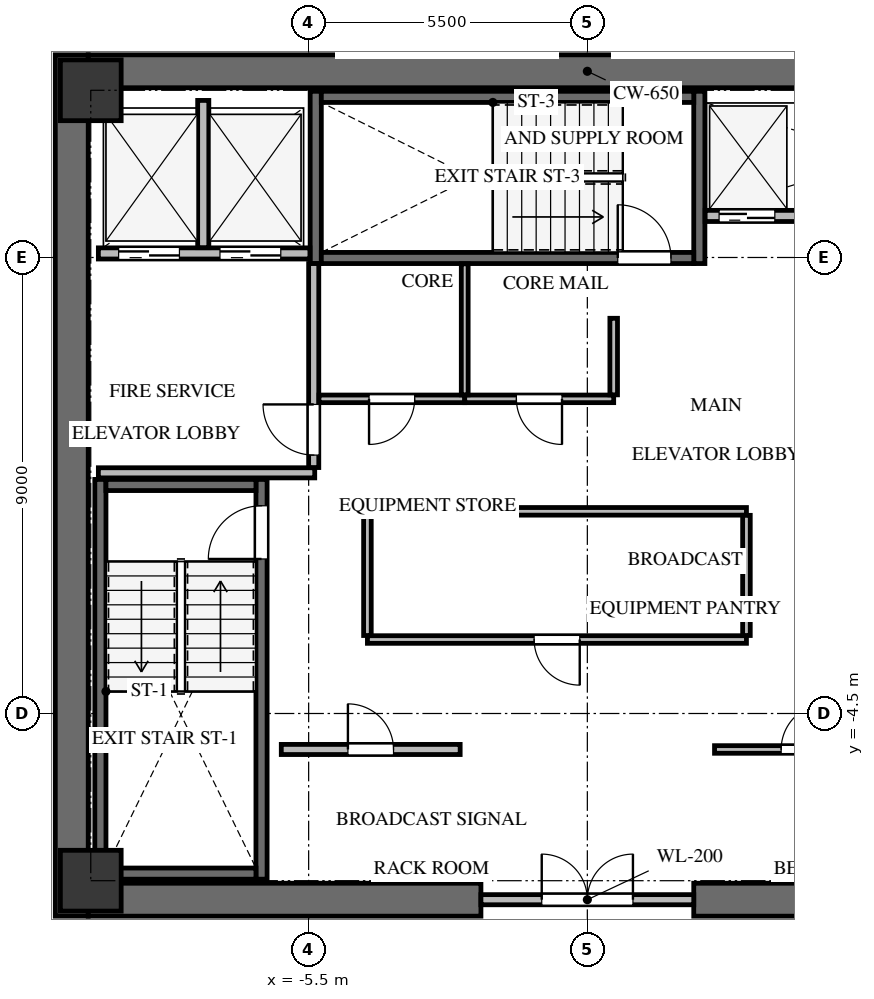
"""IFC4 building model, lengths in metres.
Left out: names, types, materials, properties, quantities, classifications, styles, units other than length and angle.
Written with IfcOpenShell. Run it as: python <this file> out.ifc"""

import sys

from ifc_helpers import new_model, si_unit, direction, frame, frame_2d, origin, origin_2d, place, context, subcontext, project, spatial, rectangle, extrude, source, transform, mapped, element, fill, save


model = new_model("IFC4")
c1 = context("Model", 3, precision=1e-05, world=origin(), true_north=direction((0.0, 1.0)))
c2 = subcontext(c1, "Body", "Model", "MODEL_VIEW")
j1 = project(units=[si_unit("LENGTHUNIT", "METRE"), si_unit("PLANEANGLEUNIT", "RADIAN")], contexts=[c1])
p1 = place(None, origin())
s1 = spatial("IfcSite", under=j1, at=p1, CompositionType="ELEMENT")
p2 = place(p1, origin())
s2 = spatial("IfcBuilding", under=s1, at=p2, CompositionType="ELEMENT")
p3 = place(p2, frame((0.0, 0.0, 159.3)))
s3 = spatial("IfcBuildingStorey", under=s2, at=p3, CompositionType="ELEMENT", Elevation=159.3)
p4 = place(p3, frame((-10.175, -8.5, 0.0), z_axis=(0.0, 0.0, 1.0), x_axis=(0.0, 1.0, 0.0)))
e1 = element("IfcWall", 1, at=p4, inside=s3, PredefinedType="SHEAR", context=c2, shape_type="SweptSolid", body=[
    extrude(rectangle(XDim=17.0, YDim=0.65, at=frame_2d((8.5, 0.0))), origin(), (0.0, 0.0, 1.0), 3.3),
])
for number, where, z_axis, x_axis in (
    (2, (-9.85, -8.175, 0.0), (0.0, 0.0, 1.0), (1.0, 0.0, 0.0)),
    (3, (2.1, -8.175, 0.0), (0.0, 0.0, 1.0), (1.0, 0.0, 0.0)),
):
    element("IfcWall", number, at=place(p3, frame(where, z_axis=z_axis, x_axis=x_axis)), inside=s3, PredefinedType="SHEAR", context=c2, shape_type="SweptSolid", body=[
        extrude(rectangle(XDim=7.75, YDim=0.65, at=frame_2d((3.875, 0.0))), origin(), (0.0, 0.0, 1.0), 3.3),
    ])
p5 = place(p3, frame((-9.85, 8.175, 0.0), z_axis=(0.0, 0.0, 1.0), x_axis=(1.0, 0.0, 0.0)))
e4 = element("IfcWall", 4, at=p5, inside=s3, PredefinedType="SHEAR", context=c2, shape_type="SweptSolid", body=[
    extrude(rectangle(XDim=19.7, YDim=0.65, at=frame_2d((9.85, 0.0))), origin(), (0.0, 0.0, 1.0), 3.3),
])
p6 = place(p3, frame((-6.43, -7.77, -0.24), z_axis=(0.0, 0.0, 1.0), x_axis=(0.0, 1.0, 0.0)))
e5 = element("IfcWall", 5, at=p6, inside=s3, PredefinedType="SHEAR", context=c2, shape_type="SweptSolid", body=[
    extrude(rectangle(XDim=7.89, YDim=0.22, at=frame_2d((3.945, 0.0))), origin(), (0.0, 0.0, 1.0), 3.22),
])
p7 = place(p6, frame((6.32, 0.0, 0.0)))
e6 = element("IfcOpeningElement", 6, at=p7, cuts=e5, PredefinedType="OPENING", context=c2, shape_type="SweptSolid", body=[
    extrude(rectangle(XDim=1.05, YDim=2.15, at=frame_2d((0.525, 1.075))), frame((0.0, 0.12, 0.0), z_axis=(0.0, -1.0, 0.0), x_axis=(1.0, 0.0, 0.0)), (0.0, 0.0, 1.0), 0.24),
])
p8 = place(p3, frame((-9.61, 0.12, -0.24), z_axis=(0.0, 0.0, 1.0), x_axis=(0.0, -1.0, 0.0)))
e7 = element("IfcWall", 7, at=p8, inside=s3, PredefinedType="SHEAR", context=c2, shape_type="SweptSolid", body=[
    extrude(rectangle(XDim=7.89, YDim=0.22, at=frame_2d((3.945, 0.0))), origin(), (0.0, 0.0, 1.0), 3.22),
])
for number, where, z_axis, x_axis in (
    (8, (-9.5, -7.66, -0.24), (0.0, 0.0, 1.0), (1.0, 0.0, 0.0)),
    (9, (-6.54, 0.01, -0.24), (0.0, 0.0, 1.0), (-1.0, 0.0, 0.0)),
):
    element("IfcWall", number, at=place(p3, frame(where, z_axis=z_axis, x_axis=x_axis)), inside=s3, PredefinedType="SHEAR", context=c2, shape_type="SweptSolid", body=[
        extrude(rectangle(XDim=2.96, YDim=0.22, at=frame_2d((1.48, 0.0))), origin(), (0.0, 0.0, 1.0), 3.22),
    ])
for number, where, z_axis, x_axis in (
    (10, (2.21, 4.38, -0.24), (0.0, 0.0, 1.0), (0.0, 1.0, 0.0)),
    (11, (-5.36, 7.78, -0.24), (0.0, 0.0, 1.0), (0.0, -1.0, 0.0)),
):
    element("IfcWall", number, at=place(p3, frame(where, z_axis=z_axis, x_axis=x_axis)), inside=s3, PredefinedType="SHEAR", context=c2, shape_type="SweptSolid", body=[
        extrude(rectangle(XDim=3.4, YDim=0.22, at=frame_2d((1.7, 0.0))), origin(), (0.0, 0.0, 1.0), 3.22),
    ])
p9 = place(p3, frame((-5.25, 4.49, -0.24), z_axis=(0.0, 0.0, 1.0), x_axis=(1.0, 0.0, 0.0)))
e12 = element("IfcWall", 12, at=p9, inside=s3, PredefinedType="SHEAR", context=c2, shape_type="SweptSolid", body=[
    extrude(rectangle(XDim=7.35, YDim=0.22, at=frame_2d((3.675, 0.0))), origin(), (0.0, 0.0, 1.0), 3.22),
])
p10 = place(p9, frame((5.85, 0.0, 0.0)))
e13 = element("IfcOpeningElement", 13, at=p10, cuts=e12, PredefinedType="OPENING", context=c2, shape_type="SweptSolid", body=[
    extrude(rectangle(XDim=1.05, YDim=2.15, at=frame_2d((0.525, 1.075))), frame((0.0, 0.12, 0.0), z_axis=(0.0, -1.0, 0.0), x_axis=(1.0, 0.0, 0.0)), (0.0, 0.0, 1.0), 0.24),
])
p11 = place(p3, frame((2.1, 7.67, -0.24), z_axis=(0.0, 0.0, 1.0), x_axis=(-1.0, 0.0, 0.0)))
e14 = element("IfcWall", 14, at=p11, inside=s3, PredefinedType="SHEAR", context=c2, shape_type="SweptSolid", body=[
    extrude(rectangle(XDim=7.35, YDim=0.22, at=frame_2d((3.675, 0.0))), origin(), (0.0, 0.0, 1.0), 3.22),
])
m1 = source(origin(), c2, "Body", "SweptSolid", [
    extrude(rectangle(XDim=1.2, YDim=1.2, at=origin_2d()), origin(), (0.0, 0.0, 1.0), 3.22),
])
for number, where, z_axis, x_axis in (
    (15, (-9.8, -7.8, -0.24), (0.0, 0.0, 1.0), (1.0, 0.0, 0.0)),
    (16, (-9.8, 7.8, -0.24), (0.0, 0.0, 1.0), (1.0, 0.0, 0.0)),
):
    element("IfcColumn", number, at=place(p3, frame(where, z_axis=z_axis, x_axis=x_axis)), inside=s3, PredefinedType="COLUMN", context=c2, shape_type="MappedRepresentation", body=[
        mapped(m1, transform((0.0, 0.0, 0.0), x_axis=(1.0, 0.0, 0.0), y_axis=(0.0, 1.0, 0.0), z_axis=(0.0, 0.0, 1.0), scale=1.0)),
    ])
p12 = place(p3, frame((-2.1, -8.175, 0.0), z_axis=(0.0, 0.0, 1.0), x_axis=(1.0, 0.0, 0.0)))
e17 = element("IfcWall", 17, at=p12, inside=s3, PredefinedType="SOLIDWALL", context=c2, shape_type="SweptSolid", body=[
    extrude(rectangle(XDim=4.2, YDim=0.2, at=frame_2d((2.1, 0.0))), origin(), (0.0, 0.0, 1.0), 2.965),
])
p13 = place(p12, frame((1.2, 0.0, 0.0)))
e18 = element("IfcOpeningElement", 18, at=p13, cuts=e17, PredefinedType="OPENING", context=c2, shape_type="SweptSolid", body=[
    extrude(rectangle(XDim=1.8, YDim=2.15, at=frame_2d((0.9, 1.075))), frame((0.0, 0.11, 0.0), z_axis=(0.0, -1.0, 0.0), x_axis=(1.0, 0.0, 0.0)), (0.0, 0.0, 1.0), 0.22),
])
p14 = place(p3, frame((-9.65, 4.58, 0.0), z_axis=(0.0, 0.0, 1.0), x_axis=(1.0, 0.0, 0.0)))
e19 = element("IfcWall", 19, at=p14, inside=s3, PredefinedType="SOLIDWALL", context=c2, shape_type="SweptSolid", body=[
    extrude(rectangle(XDim=4.175, YDim=0.22, at=frame_2d((2.087, 0.0))), origin(), (0.0, 0.0, 1.0), 2.965),
])
p15 = place(p14, frame((0.4, 0.0, 0.0)))
e20 = element("IfcOpeningElement", 20, at=p15, cuts=e19, PredefinedType="OPENING", context=c2, shape_type="SweptSolid", body=[
    extrude(rectangle(XDim=1.2, YDim=2.15, at=frame_2d((0.6, 1.075))), frame((0.0, 0.12, 0.0), z_axis=(0.0, -1.0, 0.0), x_axis=(1.0, 0.0, 0.0)), (0.0, 0.0, 1.0), 0.24),
])
p16 = place(p14, frame((2.4, 0.0, 0.0)))
e21 = element("IfcOpeningElement", 21, at=p16, cuts=e19, PredefinedType="OPENING", context=c2, shape_type="SweptSolid", body=[
    extrude(rectangle(XDim=1.2, YDim=2.15, at=frame_2d((0.6, 1.075))), frame((0.0, 0.12, 0.0), z_axis=(0.0, -1.0, 0.0), x_axis=(1.0, 0.0, 0.0)), (0.0, 0.0, 1.0), 0.24),
])
p17 = place(p3, frame((-7.58, 4.694, 0.0), z_axis=(0.0, 0.0, 1.0), x_axis=(0.0, 1.0, 0.0)))
e22 = element("IfcWall", 22, at=p17, inside=s3, PredefinedType="SOLIDWALL", context=c2, shape_type="SweptSolid", body=[
    extrude(rectangle(XDim=2.906, YDim=0.22, at=frame_2d((1.453, 0.0))), origin(), (0.0, 0.0, 1.0), 2.965),
])
p18 = place(p3, frame((-9.65, 0.25, 0.0), z_axis=(0.0, 0.0, 1.0), x_axis=(1.0, 0.0, 0.0)))
e23 = element("IfcWall", 23, at=p18, inside=s3, PredefinedType="SOLIDWALL", context=c2, shape_type="SweptSolid", body=[
    extrude(rectangle(XDim=4.27, YDim=0.2, at=frame_2d((2.135, 0.0))), origin(), (0.0, 0.0, 1.0), 2.965),
])
p19 = place(p3, frame((-5.4, 0.354, 0.0), z_axis=(0.0, 0.0, 1.0), x_axis=(0.0, 1.0, 0.0)))
e24 = element("IfcWall", 24, at=p19, inside=s3, PredefinedType="SOLIDWALL", context=c2, shape_type="SweptSolid", body=[
    extrude(rectangle(XDim=4.026, YDim=0.2, at=frame_2d((2.013, 0.0))), origin(), (0.0, 0.0, 1.0), 2.965),
])
p20 = place(p19, frame((0.246, 0.0, 0.0)))
e25 = element("IfcOpeningElement", 25, at=p20, cuts=e24, PredefinedType="OPENING", context=c2, shape_type="SweptSolid", body=[
    extrude(rectangle(XDim=1.0, YDim=2.15, at=frame_2d((0.5, 1.075))), frame((0.0, 0.11, 0.0), z_axis=(0.0, -1.0, 0.0), x_axis=(1.0, 0.0, 0.0)), (0.0, 0.0, 1.0), 0.22),
])
p21 = place(p3, frame((2.325, 5.32, 0.0), z_axis=(0.0, 0.0, 1.0), x_axis=(1.0, 0.0, 0.0)))
e26 = element("IfcWall", 26, at=p21, inside=s3, PredefinedType="SOLIDWALL", context=c2, shape_type="SweptSolid", body=[
    extrude(rectangle(XDim=7.325, YDim=0.22, at=frame_2d((3.663, 0.0))), origin(), (0.0, 0.0, 1.0), 2.965),
])
p22 = place(p21, frame((0.275, 0.0, 0.0)))
e27 = element("IfcOpeningElement", 27, at=p22, cuts=e26, PredefinedType="OPENING", context=c2, shape_type="SweptSolid", body=[
    extrude(rectangle(XDim=1.1, YDim=2.15, at=frame_2d((0.55, 1.075))), frame((0.0, 0.12, 0.0), z_axis=(0.0, -1.0, 0.0), x_axis=(1.0, 0.0, 0.0)), (0.0, 0.0, 1.0), 0.24),
])
p23 = place(p21, frame((2.045, 0.0, 0.0)))
e28 = element("IfcOpeningElement", 28, at=p23, cuts=e26, PredefinedType="OPENING", context=c2, shape_type="SweptSolid", body=[
    extrude(rectangle(XDim=1.1, YDim=2.15, at=frame_2d((0.55, 1.075))), frame((0.0, 0.12, 0.0), z_axis=(0.0, -1.0, 0.0), x_axis=(1.0, 0.0, 0.0)), (0.0, 0.0, 1.0), 0.24),
])
p24 = place(p21, frame((3.815, 0.0, 0.0)))
e29 = element("IfcOpeningElement", 29, at=p24, cuts=e26, PredefinedType="OPENING", context=c2, shape_type="SweptSolid", body=[
    extrude(rectangle(XDim=1.1, YDim=2.15, at=frame_2d((0.55, 1.075))), frame((0.0, 0.12, 0.0), z_axis=(0.0, -1.0, 0.0), x_axis=(1.0, 0.0, 0.0)), (0.0, 0.0, 1.0), 0.24),
])
p25 = place(p21, frame((5.585, 0.0, 0.0)))
e30 = element("IfcOpeningElement", 30, at=p25, cuts=e26, PredefinedType="OPENING", context=c2, shape_type="SweptSolid", body=[
    extrude(rectangle(XDim=1.1, YDim=2.15, at=frame_2d((0.55, 1.075))), frame((0.0, 0.12, 0.0), z_axis=(0.0, -1.0, 0.0), x_axis=(1.0, 0.0, 0.0)), (0.0, 0.0, 1.0), 0.24),
])
p26 = place(p3, frame((-6.04, -5.21, 0.0), z_axis=(0.0, 0.0, 1.0), x_axis=(1.0, 0.0, 0.0)))
e31 = element("IfcWall", 31, at=p26, inside=s3, PredefinedType="SOLIDWALL", context=c2, shape_type="SweptSolid", body=[
    extrude(rectangle(XDim=3.53, YDim=0.2, at=frame_2d((1.765, 0.0))), origin(), (0.0, 0.0, 1.0), 2.965),
])
p27 = place(p26, frame((1.315, 0.0, 0.0)))
e32 = element("IfcOpeningElement", 32, at=p27, cuts=e31, PredefinedType="OPENING", context=c2, shape_type="SweptSolid", body=[
    extrude(rectangle(XDim=0.9, YDim=2.05, at=frame_2d((0.45, 1.025))), frame((0.0, 0.11, 0.0), z_axis=(0.0, -1.0, 0.0), x_axis=(1.0, 0.0, 0.0)), (0.0, 0.0, 1.0), 0.22),
])
p28 = place(p3, frame((2.51, -5.21, 0.0), z_axis=(0.0, 0.0, 1.0), x_axis=(1.0, 0.0, 0.0)))
e33 = element("IfcWall", 33, at=p28, inside=s3, PredefinedType="PARTITIONING", context=c2, shape_type="SweptSolid", body=[
    extrude(rectangle(XDim=3.53, YDim=0.15, at=frame_2d((1.765, 0.0))), origin(), (0.0, 0.0, 1.0), 2.965),
])
p29 = place(p28, frame((1.315, 0.0, 0.0)))
e34 = element("IfcOpeningElement", 34, at=p29, cuts=e33, PredefinedType="OPENING", context=c2, shape_type="SweptSolid", body=[
    extrude(rectangle(XDim=0.9, YDim=2.05, at=frame_2d((0.45, 1.025))), frame((0.0, 0.085, 0.0), z_axis=(0.0, -1.0, 0.0), x_axis=(1.0, 0.0, 0.0)), (0.0, 0.0, 1.0), 0.17),
])
p30 = place(p3, frame((3.14, -3.04, 0.0), z_axis=(0.0, 0.0, 1.0), x_axis=(-1.0, 0.0, 0.0)))
e35 = element("IfcWall", 35, at=p30, inside=s3, PredefinedType="PARTITIONING", context=c2, shape_type="SweptSolid", body=[
    extrude(rectangle(XDim=7.48, YDim=0.15, at=frame_2d((3.74, 0.0))), origin(), (0.0, 0.0, 1.0), 2.965),
])
p31 = place(p30, frame((3.29, 0.0, 0.0)))
e36 = element("IfcOpeningElement", 36, at=p31, cuts=e35, PredefinedType="OPENING", context=c2, shape_type="SweptSolid", body=[
    extrude(rectangle(XDim=0.9, YDim=2.05, at=frame_2d((0.45, 1.025))), frame((0.0, 0.085, 0.0), z_axis=(0.0, -1.0, 0.0), x_axis=(1.0, 0.0, 0.0)), (0.0, 0.0, 1.0), 0.17),
])
p32 = place(p3, frame((-4.34, -0.51, 0.0), z_axis=(0.0, 0.0, 1.0), x_axis=(1.0, 0.0, 0.0)))
e37 = element("IfcWall", 37, at=p32, inside=s3, PredefinedType="PARTITIONING", context=c2, shape_type="SweptSolid", body=[
    extrude(rectangle(XDim=7.48, YDim=0.15, at=frame_2d((3.74, 0.0))), origin(), (0.0, 0.0, 1.0), 2.965),
])
for number, where, z_axis, x_axis in (
    (38, (-4.34, -2.961, 0.0), (0.0, 0.0, 1.0), (0.0, 1.0, 0.0)),
    (39, (3.14, -0.589, 0.0), (0.0, 0.0, 1.0), (0.0, -1.0, 0.0)),
):
    element("IfcWall", number, at=place(p3, frame(where, z_axis=z_axis, x_axis=x_axis)), inside=s3, PredefinedType="PARTITIONING", context=c2, shape_type="SweptSolid", body=[
        extrude(rectangle(XDim=2.372, YDim=0.15, at=frame_2d((1.186, 0.0))), origin(), (0.0, 0.0, 1.0), 2.965),
    ])
p33 = place(p3, frame((-2.42, 1.71, 0.0), z_axis=(0.0, 0.0, 1.0), x_axis=(-1.0, 0.0, 0.0)))
e40 = element("IfcWall", 40, at=p33, inside=s3, PredefinedType="PARTITIONING", context=c2, shape_type="SweptSolid", body=[
    extrude(rectangle(XDim=2.876, YDim=0.15, at=frame_2d((1.438, 0.0))), origin(), (0.0, 0.0, 1.0), 2.965),
])
p34 = place(p33, frame((0.988, 0.0, 0.0)))
e41 = element("IfcOpeningElement", 41, at=p34, cuts=e40, PredefinedType="OPENING", context=c2, shape_type="SweptSolid", body=[
    extrude(rectangle(XDim=0.9, YDim=2.05, at=frame_2d((0.45, 1.025))), frame((0.0, 0.085, 0.0), z_axis=(0.0, -1.0, 0.0), x_axis=(1.0, 0.0, 0.0)), (0.0, 0.0, 1.0), 0.17),
])
p35 = place(p3, frame((0.52, 1.71, 0.0), z_axis=(0.0, 0.0, 1.0), x_axis=(-1.0, 0.0, 0.0)))
e42 = element("IfcWall", 42, at=p35, inside=s3, PredefinedType="PARTITIONING", context=c2, shape_type="SweptSolid", body=[
    extrude(rectangle(XDim=2.94, YDim=0.15, at=frame_2d((1.47, 0.0))), origin(), (0.0, 0.0, 1.0), 2.965),
])
p36 = place(p35, frame((1.02, 0.0, 0.0)))
e43 = element("IfcOpeningElement", 43, at=p36, cuts=e42, PredefinedType="OPENING", context=c2, shape_type="SweptSolid", body=[
    extrude(rectangle(XDim=0.9, YDim=2.05, at=frame_2d((0.45, 1.025))), frame((0.0, 0.085, 0.0), z_axis=(0.0, -1.0, 0.0), x_axis=(1.0, 0.0, 0.0)), (0.0, 0.0, 1.0), 0.17),
])
p37 = place(p3, frame((0.52, 3.3, 0.0), z_axis=(0.0, 0.0, 1.0), x_axis=(0.0, -1.0, 0.0)))
e44 = element("IfcWall", 44, at=p37, inside=s3, PredefinedType="PARTITIONING", context=c2, shape_type="SweptSolid", body=[
    extrude(rectangle(XDim=1.511, YDim=0.15, at=frame_2d((0.755, 0.0))), origin(), (0.0, 0.0, 1.0), 2.965),
])
p38 = place(p3, frame((-2.42, 4.375, 0.0), z_axis=(0.0, 0.0, 1.0), x_axis=(0.0, -1.0, 0.0)))
e45 = element("IfcWall", 45, at=p38, inside=s3, PredefinedType="PARTITIONING", context=c2, shape_type="SweptSolid", body=[
    extrude(rectangle(XDim=2.586, YDim=0.135, at=frame_2d((1.293, 0.0))), origin(), (0.0, 0.0, 1.0), 2.965),
])
m2 = source(origin(), c2, "Body", "SweptSolid", [
    extrude(rectangle(XDim=1.05, YDim=2.15, at=frame_2d((0.525, 1.075))), frame((0.0, 0.025, 0.0), z_axis=(0.0, -1.0, 0.0), x_axis=(1.0, 0.0, 0.0)), (0.0, 0.0, 1.0), 0.05),
])
p39 = place(p7, origin())
e46 = element("IfcDoor", 46, at=p39, inside=s3, OperationType="SINGLE_SWING_LEFT", PredefinedType="DOOR", context=c2, shape_type="MappedRepresentation", body=[
    mapped(m2, transform((0.0, 0.0, 0.0), x_axis=(1.0, 0.0, 0.0), y_axis=(0.0, 1.0, 0.0), z_axis=(0.0, 0.0, 1.0), scale=1.0)),
])
fill(e6, e46)
p40 = place(p10, origin())
e47 = element("IfcDoor", 47, at=p40, inside=s3, OperationType="SINGLE_SWING_LEFT", PredefinedType="DOOR", context=c2, shape_type="MappedRepresentation", body=[
    mapped(m2, transform((0.0, 0.0, 0.0), x_axis=(1.0, 0.0, 0.0), y_axis=(0.0, 1.0, 0.0), z_axis=(0.0, 0.0, 1.0), scale=1.0)),
])
fill(e13, e47)
m3 = source(origin(), c2, "Body", "SweptSolid", [
    extrude(rectangle(XDim=1.8, YDim=2.15, at=frame_2d((0.9, 1.075))), frame((0.0, 0.025, 0.0), z_axis=(0.0, -1.0, 0.0), x_axis=(1.0, 0.0, 0.0)), (0.0, 0.0, 1.0), 0.05),
])
p41 = place(p13, origin())
e48 = element("IfcDoor", 48, at=p41, inside=s3, OperationType="DOUBLE_DOOR_SINGLE_SWING", PredefinedType="DOOR", context=c2, shape_type="MappedRepresentation", body=[
    mapped(m3, transform((0.0, 0.0, 0.0), x_axis=(1.0, 0.0, 0.0), y_axis=(0.0, 1.0, 0.0), z_axis=(0.0, 0.0, 1.0), scale=1.0)),
])
fill(e18, e48)
m4 = source(origin(), c2, "Body", "SweptSolid", [
    extrude(rectangle(XDim=1.2, YDim=2.15, at=frame_2d((0.6, 1.075))), frame((0.0, 0.025, 0.0), z_axis=(0.0, -1.0, 0.0), x_axis=(1.0, 0.0, 0.0)), (0.0, 0.0, 1.0), 0.05),
])
p42 = place(p15, origin())
e49 = element("IfcDoor", 49, at=p42, inside=s3, OperationType="DOUBLE_DOOR_SLIDING", PredefinedType="DOOR", context=c2, shape_type="MappedRepresentation", body=[
    mapped(m4, transform((0.0, 0.0, 0.0), x_axis=(1.0, 0.0, 0.0), y_axis=(0.0, 1.0, 0.0), z_axis=(0.0, 0.0, 1.0), scale=1.0)),
])
fill(e20, e49)
p43 = place(p16, origin())
e50 = element("IfcDoor", 50, at=p43, inside=s3, OperationType="DOUBLE_DOOR_SLIDING", PredefinedType="DOOR", context=c2, shape_type="MappedRepresentation", body=[
    mapped(m4, transform((0.0, 0.0, 0.0), x_axis=(1.0, 0.0, 0.0), y_axis=(0.0, 1.0, 0.0), z_axis=(0.0, 0.0, 1.0), scale=1.0)),
])
fill(e21, e50)
m5 = source(origin(), c2, "Body", "SweptSolid", [
    extrude(rectangle(XDim=1.0, YDim=2.15, at=frame_2d((0.5, 1.075))), frame((0.0, 0.025, 0.0), z_axis=(0.0, -1.0, 0.0), x_axis=(1.0, 0.0, 0.0)), (0.0, 0.0, 1.0), 0.05),
])
p44 = place(p20, origin())
e51 = element("IfcDoor", 51, at=p44, inside=s3, OperationType="SINGLE_SWING_RIGHT", PredefinedType="DOOR", context=c2, shape_type="MappedRepresentation", body=[
    mapped(m5, transform((0.0, 0.0, 0.0), x_axis=(1.0, 0.0, 0.0), y_axis=(0.0, 1.0, 0.0), z_axis=(0.0, 0.0, 1.0), scale=1.0)),
])
fill(e25, e51)
m6 = source(origin(), c2, "Body", "SweptSolid", [
    extrude(rectangle(XDim=1.1, YDim=2.15, at=frame_2d((0.55, 1.075))), frame((0.0, 0.025, 0.0), z_axis=(0.0, -1.0, 0.0), x_axis=(1.0, 0.0, 0.0)), (0.0, 0.0, 1.0), 0.05),
])
p45 = place(p22, origin())
e52 = element("IfcDoor", 52, at=p45, inside=s3, OperationType="DOUBLE_DOOR_SLIDING", PredefinedType="DOOR", context=c2, shape_type="MappedRepresentation", body=[
    mapped(m6, transform((0.0, 0.0, 0.0), x_axis=(1.0, 0.0, 0.0), y_axis=(0.0, 1.0, 0.0), z_axis=(0.0, 0.0, 1.0), scale=1.0)),
])
fill(e27, e52)
m7 = source(origin(), c2, "Body", "SweptSolid", [
    extrude(rectangle(XDim=0.9, YDim=2.05, at=frame_2d((0.45, 1.025))), frame((0.0, 0.025, 0.0), z_axis=(0.0, -1.0, 0.0), x_axis=(1.0, 0.0, 0.0)), (0.0, 0.0, 1.0), 0.05),
])
p46 = place(p27, origin())
e53 = element("IfcDoor", 53, at=p46, inside=s3, OperationType="SINGLE_SWING_LEFT", PredefinedType="DOOR", context=c2, shape_type="MappedRepresentation", body=[
    mapped(m7, transform((0.0, 0.0, 0.0), x_axis=(1.0, 0.0, 0.0), y_axis=(0.0, 1.0, 0.0), z_axis=(0.0, 0.0, 1.0), scale=1.0)),
])
fill(e32, e53)
m8 = source(origin(), c2, "Body", "SweptSolid", [
    extrude(rectangle(XDim=0.9, YDim=2.05, at=frame_2d((0.45, 1.025))), frame((0.0, 0.025, 0.0), z_axis=(0.0, -1.0, 0.0), x_axis=(1.0, 0.0, 0.0)), (0.0, 0.0, 1.0), 0.05),
])
p47 = place(p29, origin())
e54 = element("IfcDoor", 54, at=p47, inside=s3, OperationType="SINGLE_SWING_RIGHT", PredefinedType="DOOR", context=c2, shape_type="MappedRepresentation", body=[
    mapped(m8, transform((0.0, 0.0, 0.0), x_axis=(1.0, 0.0, 0.0), y_axis=(0.0, 1.0, 0.0), z_axis=(0.0, 0.0, 1.0), scale=1.0)),
])
fill(e34, e54)
p48 = place(p31, origin())
e55 = element("IfcDoor", 55, at=p48, inside=s3, OperationType="SINGLE_SWING_LEFT", PredefinedType="DOOR", context=c2, shape_type="MappedRepresentation", body=[
    mapped(m7, transform((0.0, 0.0, 0.0), x_axis=(1.0, 0.0, 0.0), y_axis=(0.0, 1.0, 0.0), z_axis=(0.0, 0.0, 1.0), scale=1.0)),
])
fill(e36, e55)
p49 = place(p34, origin())
e56 = element("IfcDoor", 56, at=p49, inside=s3, OperationType="SINGLE_SWING_RIGHT", PredefinedType="DOOR", context=c2, shape_type="MappedRepresentation", body=[
    mapped(m8, transform((0.0, 0.0, 0.0), x_axis=(1.0, 0.0, 0.0), y_axis=(0.0, 1.0, 0.0), z_axis=(0.0, 0.0, 1.0), scale=1.0)),
])
fill(e41, e56)
p50 = place(p36, origin())
e57 = element("IfcDoor", 57, at=p50, inside=s3, OperationType="SINGLE_SWING_LEFT", PredefinedType="DOOR", context=c2, shape_type="MappedRepresentation", body=[
    mapped(m7, transform((0.0, 0.0, 0.0), x_axis=(1.0, 0.0, 0.0), y_axis=(0.0, 1.0, 0.0), z_axis=(0.0, 0.0, 1.0), scale=1.0)),
])
fill(e43, e57)
save(model, sys.argv[1])
